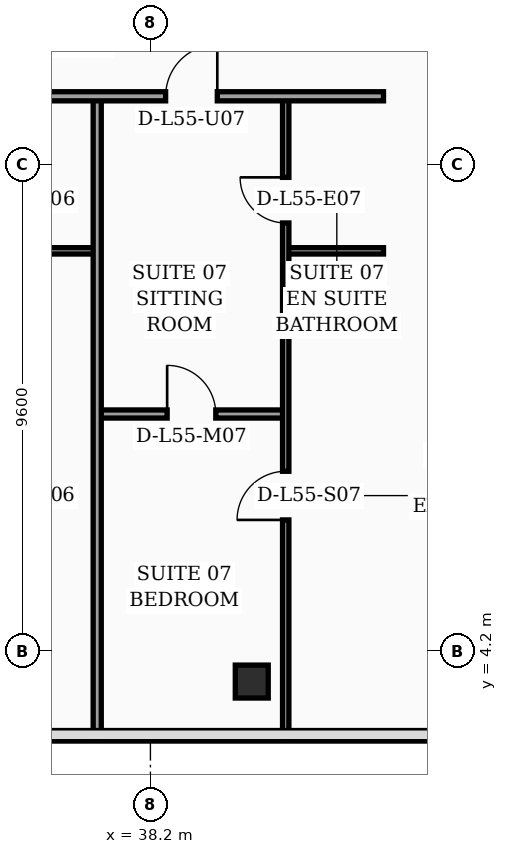
"""IFC4 building model, lengths in metres.
Left out: names, types, materials, properties, quantities, classifications, styles, units other than length and angle.
Written with IfcOpenShell. Run it as: python <this file> out.ifc"""

import sys

from ifc_helpers import new_model, si_unit, direction, frame, frame_2d, origin, origin_2d, place, context, subcontext, project, spatial, rectangle, hollow_rectangle, extrude, element, fill, save


model = new_model("IFC4")
c1 = context("Model", 3, precision=1e-05, world=origin(), true_north=direction((0.0, 1.0)))
c2 = subcontext(c1, "Body", "Model", "MODEL_VIEW")
j1 = project(units=[si_unit("LENGTHUNIT", "METRE"), si_unit("PLANEANGLEUNIT", "RADIAN")], contexts=[c1])
p1 = place(None, origin())
s1 = spatial("IfcSite", under=j1, at=p1, CompositionType="ELEMENT")
p2 = place(p1, origin())
s2 = spatial("IfcBuilding", under=s1, at=p2, CompositionType="ELEMENT")
p3 = place(p2, frame((0.0, 0.0, 223.1)))
s3 = spatial("IfcBuildingStorey", under=s2, at=p3, CompositionType="ELEMENT", Elevation=223.1)
p4 = place(p3, frame((40.2, 3.6, 0.0), z_axis=(0.0, 0.0, 1.0), x_axis=(1.0, 0.0, 0.0)))
e1 = element("IfcColumn", 1, at=p4, inside=s3, PredefinedType="COLUMN", context=c2, shape_type="SweptSolid", body=[
    extrude(hollow_rectangle(XDim=0.65, YDim=0.65, WallThickness=0.028, at=origin_2d()), origin(), (0.0, 0.0, 1.0), 3.56),
])
p5 = place(p3, frame((49.43, 5.505, 0.0), z_axis=(0.0, 0.0, 1.0), x_axis=(-0.300509063924, 0.953778958931, 0.0)))
e2 = element("IfcWall", 2, at=p5, inside=s3, PredefinedType="SOLIDWALL", context=c2, shape_type="SweptSolid", body=[
    extrude(rectangle(XDim=30.814, YDim=0.32, at=frame_2d((15.407, 0.0))), origin(), (0.0, 0.0, 1.0), 3.56),
])
p6 = place(p5, frame((10.199, 0.0, 0.0)))
e3 = element("IfcOpeningElement", 3, at=p6, cuts=e2, PredefinedType="OPENING", context=c2, shape_type="SweptSolid", body=[
    extrude(rectangle(XDim=1.4, YDim=2.25, at=frame_2d((0.7, 1.125))), frame((0.0, 0.17, 0.0), z_axis=(0.0, -1.0, 0.0), x_axis=(1.0, 0.0, 0.0)), (0.0, 0.0, 1.0), 0.34),
])
p7 = place(p5, frame((4.437, 0.0, 0.7)))
e4 = element("IfcOpeningElement", 4, at=p7, cuts=e2, PredefinedType="OPENING", context=c2, shape_type="SweptSolid", body=[
    extrude(rectangle(XDim=1.6, YDim=1.65, at=frame_2d((0.8, 0.825))), frame((0.0, 0.17, 0.0), z_axis=(0.0, -1.0, 0.0), x_axis=(1.0, 0.0, 0.0)), (0.0, 0.0, 1.0), 0.34),
])
p8 = place(p5, frame((18.696, 0.0, 0.7)))
e5 = element("IfcOpeningElement", 5, at=p8, cuts=e2, PredefinedType="OPENING", context=c2, shape_type="SweptSolid", body=[
    extrude(rectangle(XDim=1.6, YDim=1.65, at=frame_2d((0.8, 0.825))), frame((0.0, 0.17, 0.0), z_axis=(0.0, -1.0, 0.0), x_axis=(1.0, 0.0, 0.0)), (0.0, 0.0, 1.0), 0.34),
])
p9 = place(p5, frame((1.6, 0.0, 0.75)))
e6 = element("IfcOpeningElement", 6, at=p9, cuts=e2, PredefinedType="OPENING", context=c2, shape_type="SweptSolid", body=[
    extrude(rectangle(XDim=1.5, YDim=1.6, at=frame_2d((0.75, 0.8))), frame((0.0, 0.17, 0.0), z_axis=(0.0, -1.0, 0.0), x_axis=(1.0, 0.0, 0.0)), (0.0, 0.0, 1.0), 0.34),
])
p10 = place(p5, frame((7.8, 0.0, 0.75)))
e7 = element("IfcOpeningElement", 7, at=p10, cuts=e2, PredefinedType="OPENING", context=c2, shape_type="SweptSolid", body=[
    extrude(rectangle(XDim=1.5, YDim=1.6, at=frame_2d((0.75, 0.8))), frame((0.0, 0.17, 0.0), z_axis=(0.0, -1.0, 0.0), x_axis=(1.0, 0.0, 0.0)), (0.0, 0.0, 1.0), 0.34),
])
p11 = place(p5, frame((14.0, 0.0, 0.75)))
e8 = element("IfcOpeningElement", 8, at=p11, cuts=e2, PredefinedType="OPENING", context=c2, shape_type="SweptSolid", body=[
    extrude(rectangle(XDim=1.5, YDim=1.6, at=frame_2d((0.75, 0.8))), frame((0.0, 0.17, 0.0), z_axis=(0.0, -1.0, 0.0), x_axis=(1.0, 0.0, 0.0)), (0.0, 0.0, 1.0), 0.34),
])
p12 = place(p5, frame((16.55, 0.0, 0.75)))
e9 = element("IfcOpeningElement", 9, at=p12, cuts=e2, PredefinedType="OPENING", context=c2, shape_type="SweptSolid", body=[
    extrude(rectangle(XDim=1.5, YDim=1.6, at=frame_2d((0.75, 0.8))), frame((0.0, 0.17, 0.0), z_axis=(0.0, -1.0, 0.0), x_axis=(1.0, 0.0, 0.0)), (0.0, 0.0, 1.0), 0.34),
])
p13 = place(p5, frame((20.75, 0.0, 0.75)))
e10 = element("IfcOpeningElement", 10, at=p13, cuts=e2, PredefinedType="OPENING", context=c2, shape_type="SweptSolid", body=[
    extrude(rectangle(XDim=1.5, YDim=1.6, at=frame_2d((0.75, 0.8))), frame((0.0, 0.17, 0.0), z_axis=(0.0, -1.0, 0.0), x_axis=(1.0, 0.0, 0.0)), (0.0, 0.0, 1.0), 0.34),
])
p14 = place(p5, frame((23.3, 0.0, 0.75)))
e11 = element("IfcOpeningElement", 11, at=p14, cuts=e2, PredefinedType="OPENING", context=c2, shape_type="SweptSolid", body=[
    extrude(rectangle(XDim=1.5, YDim=1.6, at=frame_2d((0.75, 0.8))), frame((0.0, 0.17, 0.0), z_axis=(0.0, -1.0, 0.0), x_axis=(1.0, 0.0, 0.0)), (0.0, 0.0, 1.0), 0.34),
])
p15 = place(p5, frame((26.4, 0.0, 0.75)))
e12 = element("IfcOpeningElement", 12, at=p15, cuts=e2, PredefinedType="OPENING", context=c2, shape_type="SweptSolid", body=[
    extrude(rectangle(XDim=1.5, YDim=1.6, at=frame_2d((0.75, 0.8))), frame((0.0, 0.17, 0.0), z_axis=(0.0, -1.0, 0.0), x_axis=(1.0, 0.0, 0.0)), (0.0, 0.0, 1.0), 0.34),
])
for number, where, z_axis, x_axis in (
    (13, (35.22, 12.1, 0.0), (0.0, 0.0, 1.0), (1.0, 0.0, 0.0)),
    (14, (40.87, 12.1, 0.0), (0.0, 0.0, 1.0), (1.0, 0.0, 0.0)),
):
    element("IfcWall", number, at=place(p3, frame(where, z_axis=z_axis, x_axis=x_axis)), inside=s3, PredefinedType="PARTITIONING", context=c2, shape_type="SweptSolid", body=[
        extrude(rectangle(XDim=1.93, YDim=0.125, at=frame_2d((0.965, 0.0))), origin(), (0.0, 0.0, 1.0), 3.56),
    ])
p16 = place(p3, frame((37.15, 8.88, 0.0), z_axis=(0.0, 0.0, 1.0), x_axis=(1.0, 0.0, 0.0)))
e15 = element("IfcWall", 15, at=p16, inside=s3, PredefinedType="PARTITIONING", context=c2, shape_type="SweptSolid", body=[
    extrude(rectangle(XDim=3.72, YDim=0.16, at=frame_2d((1.86, 0.0))), origin(), (0.0, 0.0, 1.0), 2.94),
])
p17 = place(p16, frame((1.38, 0.0, 0.0)))
e16 = element("IfcOpeningElement", 16, at=p17, cuts=e15, PredefinedType="OPENING", context=c2, shape_type="SweptSolid", body=[
    extrude(rectangle(XDim=0.96, YDim=2.2, at=frame_2d((0.48, 1.1))), frame((0.0, 0.09, 0.0), z_axis=(0.0, -1.0, 0.0), x_axis=(1.0, 0.0, 0.0)), (0.0, 0.0, 1.0), 0.18),
])
p18 = place(p3, frame((40.87, 2.44, 0.0), z_axis=(0.0, 0.0, 1.0), x_axis=(0.0, 1.0, 0.0)))
e17 = element("IfcWall", 17, at=p18, inside=s3, PredefinedType="PARTITIONING", context=c2, shape_type="SweptSolid", body=[
    extrude(rectangle(XDim=12.71, YDim=0.125, at=frame_2d((6.355, 0.0))), origin(), (0.0, 0.0, 1.0), 2.94),
])
p19 = place(p18, frame((4.35, 0.0, 0.0)))
e18 = element("IfcOpeningElement", 18, at=p19, cuts=e17, PredefinedType="OPENING", context=c2, shape_type="SweptSolid", body=[
    extrude(rectangle(XDim=0.96, YDim=2.2, at=frame_2d((0.48, 1.1))), frame((0.0, 0.073, 0.0), z_axis=(0.0, -1.0, 0.0), x_axis=(1.0, 0.0, 0.0)), (0.0, 0.0, 1.0), 0.145),
])
p20 = place(p18, frame((10.21, 0.0, 0.0)))
e19 = element("IfcOpeningElement", 19, at=p20, cuts=e17, PredefinedType="OPENING", context=c2, shape_type="SweptSolid", body=[
    extrude(rectangle(XDim=0.9, YDim=2.15, at=frame_2d((0.45, 1.075))), frame((0.0, 0.073, 0.0), z_axis=(0.0, -1.0, 0.0), x_axis=(1.0, 0.0, 0.0)), (0.0, 0.0, 1.0), 0.145),
])
p21 = place(p3, frame((37.15, 2.44, 0.0), z_axis=(0.0, 0.0, 1.0), x_axis=(0.0, 1.0, 0.0)))
e20 = element("IfcWall", 20, at=p21, inside=s3, PredefinedType="PARTITIONING", context=c2, shape_type="SweptSolid", body=[
    extrude(rectangle(XDim=12.71, YDim=0.16, at=frame_2d((6.355, 0.0))), origin(), (0.0, 0.0, 1.0), 2.94),
])
p22 = place(p3, frame((32.4, 15.15, 0.0), z_axis=(0.0, 0.0, 1.0), x_axis=(1.0, 0.0, 0.0)))
e21 = element("IfcWall", 21, at=p22, inside=s3, PredefinedType="PARTITIONING", context=c2, shape_type="SweptSolid", body=[
    extrude(rectangle(XDim=10.4, YDim=0.18, at=frame_2d((5.2, 0.0))), origin(), (0.0, 0.0, 1.0), 2.94),
])
p23 = place(p22, frame((1.0, 0.0, 0.0)))
e22 = element("IfcOpeningElement", 22, at=p23, cuts=e21, PredefinedType="OPENING", context=c2, shape_type="SweptSolid", body=[
    extrude(rectangle(XDim=1.02, YDim=2.2, at=frame_2d((0.51, 1.1))), frame((0.0, 0.1, 0.0), z_axis=(0.0, -1.0, 0.0), x_axis=(1.0, 0.0, 0.0)), (0.0, 0.0, 1.0), 0.2),
])
p24 = place(p22, frame((6.1, 0.0, 0.0)))
e23 = element("IfcOpeningElement", 23, at=p24, cuts=e21, PredefinedType="OPENING", context=c2, shape_type="SweptSolid", body=[
    extrude(rectangle(XDim=1.02, YDim=2.2, at=frame_2d((0.51, 1.1))), frame((0.0, 0.1, 0.0), z_axis=(0.0, -1.0, 0.0), x_axis=(1.0, 0.0, 0.0)), (0.0, 0.0, 1.0), 0.2),
])
p25 = place(p17, origin())
e24 = element("IfcDoor", 24, at=p25, inside=s3, OperationType="SINGLE_SWING_LEFT", PredefinedType="DOOR", context=c2, shape_type="SweptSolid", body=[
    extrude(rectangle(XDim=0.96, YDim=2.2, at=frame_2d((0.48, 1.1))), frame((0.0, 0.025, 0.0), z_axis=(0.0, -1.0, 0.0), x_axis=(1.0, 0.0, 0.0)), (0.0, 0.0, 1.0), 0.05),
])
fill(e16, e24)
p26 = place(p19, origin())
e25 = element("IfcDoor", 25, at=p26, inside=s3, OperationType="SINGLE_SWING_LEFT", PredefinedType="DOOR", context=c2, shape_type="SweptSolid", body=[
    extrude(rectangle(XDim=0.96, YDim=2.2, at=frame_2d((0.48, 1.1))), frame((0.0, 0.025, 0.0), z_axis=(0.0, -1.0, 0.0), x_axis=(1.0, 0.0, 0.0)), (0.0, 0.0, 1.0), 0.05),
])
fill(e18, e25)
p27 = place(p20, origin())
e26 = element("IfcDoor", 26, at=p27, inside=s3, OperationType="SINGLE_SWING_RIGHT", PredefinedType="DOOR", context=c2, shape_type="SweptSolid", body=[
    extrude(rectangle(XDim=0.9, YDim=2.15, at=frame_2d((0.45, 1.075))), frame((0.0, 0.025, 0.0), z_axis=(0.0, -1.0, 0.0), x_axis=(1.0, 0.0, 0.0)), (0.0, 0.0, 1.0), 0.05),
])
fill(e19, e26)
p28 = place(p24, origin())
e27 = element("IfcDoor", 27, at=p28, inside=s3, OperationType="SINGLE_SWING_RIGHT", PredefinedType="DOOR", context=c2, shape_type="SweptSolid", body=[
    extrude(rectangle(XDim=1.02, YDim=2.2, at=frame_2d((0.51, 1.1))), frame((0.0, 0.025, 0.0), z_axis=(0.0, -1.0, 0.0), x_axis=(1.0, 0.0, 0.0)), (0.0, 0.0, 1.0), 0.05),
])
fill(e23, e27)
save(model, sys.argv[1])
